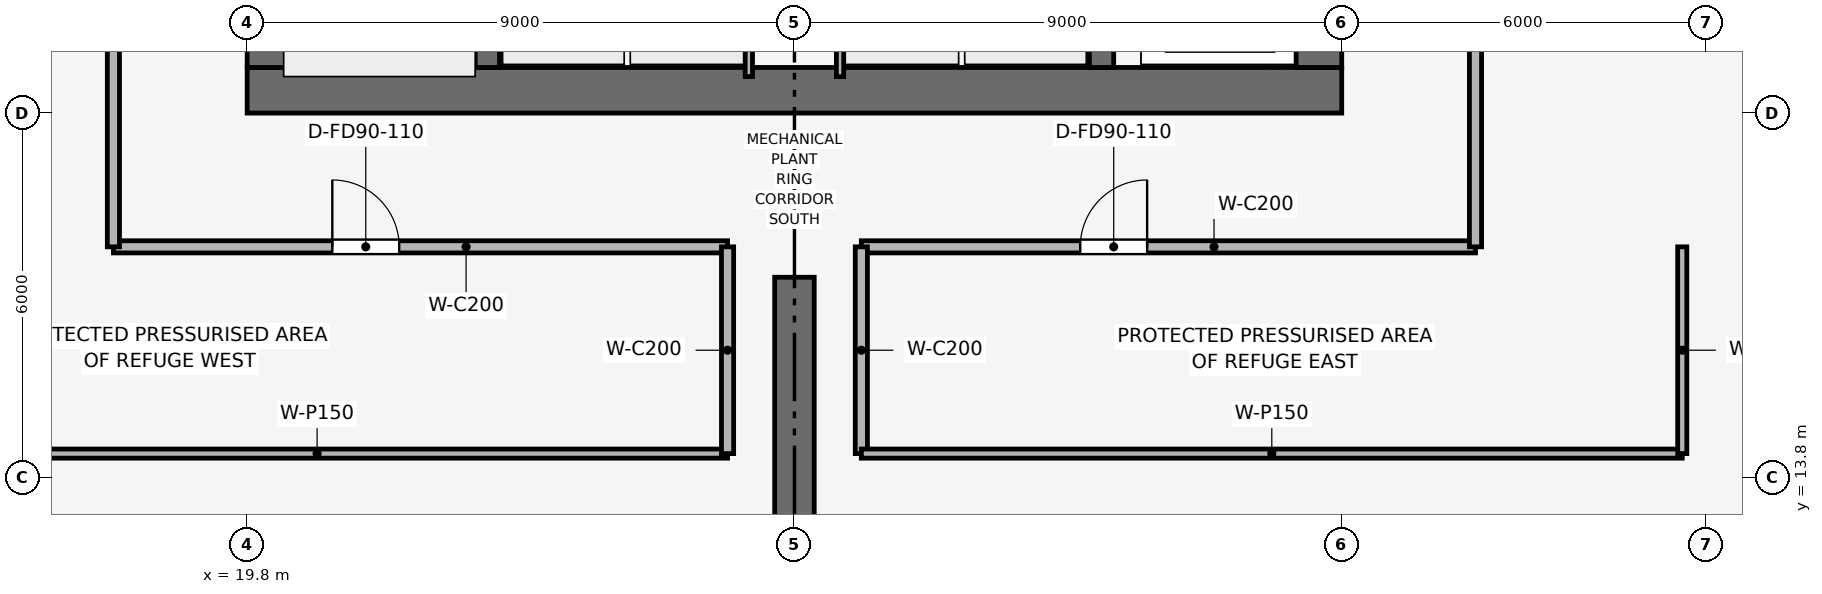
"""IFC4 building model, lengths in metres.
Left out: names, types, materials, properties, quantities, classifications, styles, units other than length and angle.
Written with IfcOpenShell. Run it as: python <this file> out.ifc"""

import sys

from ifc_helpers import new_model, si_unit, direction, frame, frame_2d, origin, place, context, subcontext, project, spatial, rectangle, extrude, element, fill, save


model = new_model("IFC4")
c1 = context("Model", 3, precision=1e-05, world=origin(), true_north=direction((0.0, 1.0)))
c2 = subcontext(c1, "Body", "Model", "MODEL_VIEW")
j1 = project(units=[si_unit("LENGTHUNIT", "METRE"), si_unit("PLANEANGLEUNIT", "RADIAN")], contexts=[c1])
p1 = place(None, origin())
s1 = spatial("IfcSite", under=j1, at=p1, CompositionType="ELEMENT")
p2 = place(p1, origin())
s2 = spatial("IfcBuilding", under=s1, at=p2, CompositionType="ELEMENT")
p3 = place(p2, frame((0.0, 0.0, 194.55)))
s3 = spatial("IfcBuildingStorey", under=s2, at=p3, CompositionType="ELEMENT", Elevation=194.55)
p4 = place(p3, frame((19.8, 20.175, 0.0), z_axis=(0.0, 0.0, 1.0), x_axis=(1.0, 0.0, 0.0)))
e1 = element("IfcWall", 1, at=p4, inside=s3, PredefinedType="SHEAR", context=c2, shape_type="SweptSolid", body=[
    extrude(rectangle(XDim=18.0, YDim=0.75, at=frame_2d((9.0, 0.0))), origin(), (0.0, 0.0, 1.0), 5.4),
])
p5 = place(p3, frame((20.175, 20.55, 0.0), z_axis=(0.0, 0.0, 1.0), x_axis=(0.0, 1.0, 0.0)))
e2 = element("IfcWall", 2, at=p5, inside=s3, PredefinedType="SHEAR", context=c2, shape_type="SweptSolid", body=[
    extrude(rectangle(XDim=16.5, YDim=0.75, at=frame_2d((8.25, 0.0))), origin(), (0.0, 0.0, 1.0), 5.4),
])
p6 = place(p5, frame((10.25, 0.0, 0.0)))
e3 = element("IfcOpeningElement", 3, at=p6, cuts=e2, PredefinedType="OPENING", context=c2, shape_type="SweptSolid", body=[
    extrude(rectangle(XDim=1.1, YDim=2.15, at=frame_2d((0.55, 1.075))), frame((0.0, 0.385, 0.0), z_axis=(0.0, -1.0, 0.0), x_axis=(1.0, 0.0, 0.0)), (0.0, 0.0, 1.0), 0.77),
])
p7 = place(p3, frame((37.425, 20.55, 0.0), z_axis=(0.0, 0.0, 1.0), x_axis=(0.0, 1.0, 0.0)))
e4 = element("IfcWall", 4, at=p7, inside=s3, PredefinedType="SHEAR", context=c2, shape_type="SweptSolid", body=[
    extrude(rectangle(XDim=16.5, YDim=0.75, at=frame_2d((8.25, 0.0))), origin(), (0.0, 0.0, 1.0), 5.4),
])
p8 = place(p7, frame((4.75, 0.0, 0.0)))
e5 = element("IfcOpeningElement", 5, at=p8, cuts=e4, PredefinedType="OPENING", context=c2, shape_type="SweptSolid", body=[
    extrude(rectangle(XDim=1.1, YDim=2.15, at=frame_2d((0.55, 1.075))), frame((0.0, 0.385, 0.0), z_axis=(0.0, -1.0, 0.0), x_axis=(1.0, 0.0, 0.0)), (0.0, 0.0, 1.0), 0.77),
])
for number, where, z_axis, x_axis in (
    (6, (23.75, 20.55, 0.0), (0.0, 0.0, 1.0), (0.0, 1.0, 0.0)),
    (7, (33.85, 20.55, 0.0), (0.0, 0.0, 1.0), (0.0, 1.0, 0.0)),
):
    element("IfcWall", number, at=place(p3, frame(where, z_axis=z_axis, x_axis=x_axis)), inside=s3, PredefinedType="SHEAR", context=c2, shape_type="SweptSolid", body=[
        extrude(rectangle(XDim=16.5, YDim=0.4, at=frame_2d((8.25, 0.0))), origin(), (0.0, 0.0, 1.0), 5.4),
    ])
p9 = place(p3, frame((28.8, 17.1, 0.0), z_axis=(0.0, 0.0, 1.0), x_axis=(0.0, -1.0, 0.0)))
e8 = element("IfcWall", 8, at=p9, inside=s3, PredefinedType="SHEAR", context=c2, shape_type="SweptSolid", body=[
    extrude(rectangle(XDim=12.35, YDim=0.65, at=frame_2d((6.175, 0.0))), origin(), (0.0, 0.0, 1.0), 5.15),
])
for number, where, z_axis, x_axis in (
    (9, (28.05, 20.4, 0.0), (0.0, 0.0, 1.0), (0.0, 1.0, 0.0)),
    (10, (29.55, 20.4, 0.0), (0.0, 0.0, 1.0), (0.0, 1.0, 0.0)),
):
    element("IfcWall", number, at=place(p3, frame(where, z_axis=z_axis, x_axis=x_axis)), inside=s3, PredefinedType="PARTITIONING", context=c2, shape_type="SweptSolid", body=[
        extrude(rectangle(XDim=2.75, YDim=0.12, at=frame_2d((1.375, 0.0))), origin(), (0.0, 0.0, 1.0), 5.15),
    ])
p10 = place(p3, frame((17.6, 17.6, 0.0), z_axis=(0.0, 0.0, 1.0), x_axis=(1.0, 0.0, 0.0)))
e11 = element("IfcWall", 11, at=p10, inside=s3, PredefinedType="PARTITIONING", context=c2, shape_type="SweptSolid", body=[
    extrude(rectangle(XDim=10.1, YDim=0.2, at=frame_2d((5.05, 0.0))), origin(), (0.0, 0.0, 1.0), 4.685),
])
p11 = place(p10, frame((3.6, 0.0, 0.0)))
e12 = element("IfcOpeningElement", 12, at=p11, cuts=e11, PredefinedType="OPENING", context=c2, shape_type="SweptSolid", body=[
    extrude(rectangle(XDim=1.1, YDim=2.15, at=frame_2d((0.55, 1.075))), frame((0.0, 0.11, 0.0), z_axis=(0.0, -1.0, 0.0), x_axis=(1.0, 0.0, 0.0)), (0.0, 0.0, 1.0), 0.22),
])
p12 = place(p3, frame((29.9, 17.6, 0.0), z_axis=(0.0, 0.0, 1.0), x_axis=(1.0, 0.0, 0.0)))
e13 = element("IfcWall", 13, at=p12, inside=s3, PredefinedType="PARTITIONING", context=c2, shape_type="SweptSolid", body=[
    extrude(rectangle(XDim=10.1, YDim=0.2, at=frame_2d((5.05, 0.0))), origin(), (0.0, 0.0, 1.0), 4.685),
])
p13 = place(p12, frame((3.6, 0.0, 0.0)))
e14 = element("IfcOpeningElement", 14, at=p13, cuts=e13, PredefinedType="OPENING", context=c2, shape_type="SweptSolid", body=[
    extrude(rectangle(XDim=1.1, YDim=2.15, at=frame_2d((0.55, 1.075))), frame((0.0, 0.11, 0.0), z_axis=(0.0, -1.0, 0.0), x_axis=(1.0, 0.0, 0.0)), (0.0, 0.0, 1.0), 0.22),
])
for number, where, z_axis, x_axis in (
    (15, (17.6, 17.6, 0.0), (0.0, 0.0, 1.0), (0.0, 1.0, 0.0)),
    (16, (40.0, 17.6, 0.0), (0.0, 0.0, 1.0), (0.0, 1.0, 0.0)),
):
    element("IfcWall", number, at=place(p3, frame(where, z_axis=z_axis, x_axis=x_axis)), inside=s3, PredefinedType="PARTITIONING", context=c2, shape_type="SweptSolid", body=[
        extrude(rectangle(XDim=10.1, YDim=0.2, at=frame_2d((5.05, 0.0))), origin(), (0.0, 0.0, 1.0), 4.685),
    ])
p14 = place(p3, frame((14.2, 14.2, 0.0), z_axis=(0.0, 0.0, 1.0), x_axis=(1.0, 0.0, 0.0)))
e17 = element("IfcWall", 17, at=p14, inside=s3, PredefinedType="PARTITIONING", context=c2, shape_type="SweptSolid", body=[
    extrude(rectangle(XDim=13.5, YDim=0.15, at=frame_2d((6.75, 0.0))), origin(), (0.0, 0.0, 1.0), 4.685),
])
for number, where, z_axis, x_axis in (
    (18, (27.7, 14.2, 0.0), (0.0, 0.0, 1.0), (0.0, 1.0, 0.0)),
    (19, (29.9, 14.2, 0.0), (0.0, 0.0, 1.0), (0.0, 1.0, 0.0)),
):
    element("IfcWall", number, at=place(p3, frame(where, z_axis=z_axis, x_axis=x_axis)), inside=s3, PredefinedType="PARTITIONING", context=c2, shape_type="SweptSolid", body=[
        extrude(rectangle(XDim=3.4, YDim=0.2, at=frame_2d((1.7, 0.0))), origin(), (0.0, 0.0, 1.0), 5.15),
    ])
p15 = place(p3, frame((29.9, 14.2, 0.0), z_axis=(0.0, 0.0, 1.0), x_axis=(1.0, 0.0, 0.0)))
e20 = element("IfcWall", 20, at=p15, inside=s3, PredefinedType="PARTITIONING", context=c2, shape_type="SweptSolid", body=[
    extrude(rectangle(XDim=13.5, YDim=0.15, at=frame_2d((6.75, 0.0))), origin(), (0.0, 0.0, 1.0), 4.685),
])
p16 = place(p3, frame((43.4, 14.2, 0.0), z_axis=(0.0, 0.0, 1.0), x_axis=(0.0, 1.0, 0.0)))
e21 = element("IfcWall", 21, at=p16, inside=s3, PredefinedType="PARTITIONING", context=c2, shape_type="SweptSolid", body=[
    extrude(rectangle(XDim=3.4, YDim=0.15, at=frame_2d((1.7, 0.0))), origin(), (0.0, 0.0, 1.0), 4.685),
])
p17 = place(p11, origin())
e22 = element("IfcDoor", 22, at=p17, inside=s3, OperationType="SINGLE_SWING_LEFT", PredefinedType="DOOR", context=c2, shape_type="SweptSolid", body=[
    extrude(rectangle(XDim=1.1, YDim=2.15, at=frame_2d((0.55, 1.075))), frame((0.0, 0.025, 0.0), z_axis=(0.0, -1.0, 0.0), x_axis=(1.0, 0.0, 0.0)), (0.0, 0.0, 1.0), 0.05),
])
fill(e12, e22)
p18 = place(p13, origin())
e23 = element("IfcDoor", 23, at=p18, inside=s3, OperationType="SINGLE_SWING_RIGHT", PredefinedType="DOOR", context=c2, shape_type="SweptSolid", body=[
    extrude(rectangle(XDim=1.1, YDim=2.15, at=frame_2d((0.55, 1.075))), frame((0.0, 0.025, 0.0), z_axis=(0.0, -1.0, 0.0), x_axis=(1.0, 0.0, 0.0)), (0.0, 0.0, 1.0), 0.05),
])
fill(e14, e23)
save(model, sys.argv[1])
